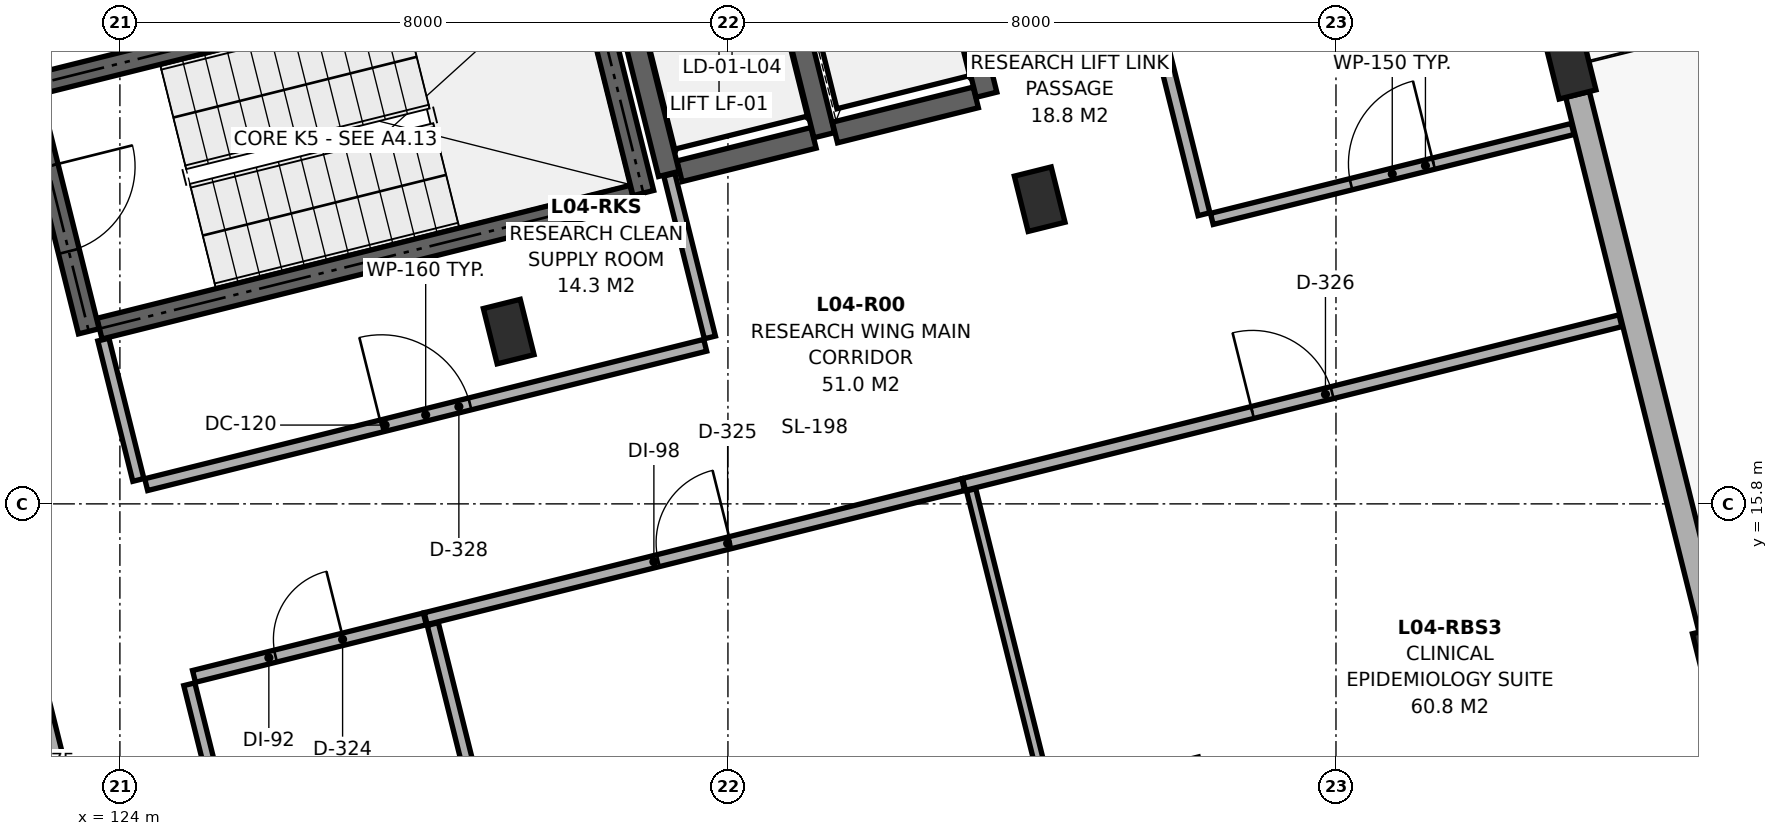
"""IFC4 building model, lengths in metres.
Left out: names, types, materials, properties, quantities, classifications, styles, units other than length and angle.
Written with IfcOpenShell. Run it as: python <this file> out.ifc"""

import sys

from ifc_helpers import new_model, si_unit, direction, frame, frame_2d, origin, origin_2d, place, context, subcontext, project, spatial, rectangle, extrude, element, fill, save


model = new_model("IFC4")
c1 = context("Model", 3, precision=1e-05, world=origin(), true_north=direction((0.0, 1.0)))
c2 = subcontext(c1, "Body", "Model", "MODEL_VIEW")
j1 = project(units=[si_unit("LENGTHUNIT", "METRE"), si_unit("PLANEANGLEUNIT", "RADIAN")], contexts=[c1])
p1 = place(None, origin())
s1 = spatial("IfcSite", under=j1, at=p1, CompositionType="ELEMENT")
p2 = place(p1, origin())
s2 = spatial("IfcBuilding", under=s1, at=p2, CompositionType="ELEMENT")
p3 = place(p2, frame((0.0, 0.0, 17.5)))
s3 = spatial("IfcBuildingStorey", under=s2, at=p3, CompositionType="ELEMENT", Elevation=17.5)
for number, where, z_axis, x_axis in (
    (1, (129.115, 18.067, 0.0), (0.0, 0.0, 1.0), (0.97, 0.242, 0.0)),
    (2, (138.037, 12.046, 0.0), (0.0, 0.0, 1.0), (0.97, 0.242, 0.0)),
    (3, (136.102, 19.808, 0.0), (0.0, 0.0, 1.0), (0.97, 0.242, 0.0)),
    (4, (145.023, 13.788, 0.0), (0.0, 0.0, 1.0), (0.97, 0.242, 0.0)),
    (5, (143.088, 21.55, 0.0), (0.0, 0.0, 1.0), (0.97, 0.242, 0.0)),
):
    element("IfcColumn", number, at=place(p3, frame(where, z_axis=z_axis, x_axis=x_axis)), inside=s3, PredefinedType="COLUMN", context=c2, shape_type="SweptSolid", body=[
        extrude(rectangle(XDim=0.5, YDim=0.75, at=origin_2d()), origin(), (0.0, 0.0, 1.0), 3.72),
    ])
p4 = place(p3, frame((143.178, 21.186, 0.0), z_axis=(0.0, 0.0, 1.0), x_axis=(0.241925454579, -0.970294838916, 0.0)))
e6 = element("IfcWall", 6, at=p4, inside=s3, PredefinedType="SOLIDWALL", context=c2, shape_type="SweptSolid", body=[
    extrude(rectangle(XDim=7.25, YDim=0.32, at=frame_2d((3.625, 0.0))), origin(), (0.0, 0.0, 1.0), 3.005),
])
p5 = place(p3, frame((123.974, 8.926, 0.0), z_axis=(0.0, 0.0, 1.0), x_axis=(-0.241917549853, 0.970296809782, 0.0)))
e7 = element("IfcWall", 7, at=p5, inside=s3, PredefinedType="SOLIDWALL", context=c2, shape_type="SweptSolid", body=[
    extrude(rectangle(XDim=7.25, YDim=0.32, at=frame_2d((3.625, 0.0))), origin(), (0.0, 0.0, 1.0), 3.005),
])
p6 = place(p3, frame((123.731, 18.105, 0.0), z_axis=(0.0, 0.0, 1.0), x_axis=(0.970297238923, 0.241915828623, 0.0)))
e8 = element("IfcWall", 8, at=p6, inside=s3, PredefinedType="SHEAR", context=c2, shape_type="SweptSolid", body=[
    extrude(rectangle(XDim=7.23, YDim=0.28, at=frame_2d((3.615, 0.0))), origin(), (0.0, 0.0, 1.0), 3.72),
])
p7 = place(p3, frame((130.887, 19.889, 0.0), z_axis=(0.0, 0.0, 1.0), x_axis=(-0.241947258837, 0.970289402158, 0.0)))
e9 = element("IfcWall", 9, at=p7, inside=s3, PredefinedType="SHEAR", context=c2, shape_type="SweptSolid", body=[
    extrude(rectangle(XDim=3.32, YDim=0.28, at=frame_2d((1.66, 0.0))), origin(), (0.0, 0.0, 1.0), 3.72),
])
p8 = place(p3, frame((129.943, 23.076, 0.0), z_axis=(0.0, 0.0, 1.0), x_axis=(-0.970289312034, -0.241947620266, 0.0)))
e10 = element("IfcWall", 10, at=p8, inside=s3, PredefinedType="SHEAR", context=c2, shape_type="SweptSolid", body=[
    extrude(rectangle(XDim=7.23, YDim=0.28, at=frame_2d((3.615, 0.0))), origin(), (0.0, 0.0, 1.0), 3.72),
])
p9 = place(p3, frame((122.787, 21.292, 0.0), z_axis=(0.0, 0.0, 1.0), x_axis=(0.241860763027, -0.970310966293, 0.0)))
e11 = element("IfcWall", 11, at=p9, inside=s3, PredefinedType="SHEAR", context=c2, shape_type="SweptSolid", body=[
    extrude(rectangle(XDim=3.32, YDim=0.28, at=frame_2d((1.66, 0.0))), origin(), (0.0, 0.0, 1.0), 3.72),
])
p10 = place(p9, frame((1.085, 0.0, 0.0)))
e12 = element("IfcOpeningElement", 12, at=p10, cuts=e11, PredefinedType="OPENING", context=c2, shape_type="SweptSolid", body=[
    extrude(rectangle(XDim=1.15, YDim=2.15, at=frame_2d((0.575, 1.075))), frame((0.0, 0.152, 0.0), z_axis=(0.0, -1.0, 0.0), x_axis=(1.0, 0.0, 0.0)), (0.0, 0.0, 1.0), 0.304),
])
p11 = place(p3, frame((131.363, 20.176, 0.0), z_axis=(0.0, 0.0, 1.0), x_axis=(0.970284587517, 0.241966566341, 0.0)))
e13 = element("IfcWall", 13, at=p11, inside=s3, PredefinedType="SHEAR", context=c2, shape_type="SweptSolid", body=[
    extrude(rectangle(XDim=1.817, YDim=0.28, at=frame_2d((0.909, 0.0))), origin(), (0.0, 0.0, 1.0), 3.72),
])
for number, where, z_axis, x_axis in (
    (14, (133.267, 20.651, 0.0), (0.0, 0.0, 1.0), (-0.242, 0.97, 0.0)),
    (15, (130.498, 23.046, 0.0), (0.0, 0.0, 1.0), (0.242, -0.97, 0.0)),
):
    element("IfcWall", number, at=place(p3, frame(where, z_axis=z_axis, x_axis=x_axis)), inside=s3, PredefinedType="SHEAR", context=c2, shape_type="SweptSolid", body=[
        extrude(rectangle(XDim=2.994, YDim=0.28, at=frame_2d((1.497, 0.0))), origin(), (0.0, 0.0, 1.0), 3.72),
    ])
p12 = place(p3, frame((133.408, 20.686, 0.0), z_axis=(0.0, 0.0, 1.0), x_axis=(0.970285190026, 0.241964150272, 0.0)))
e16 = element("IfcWall", 16, at=p12, inside=s3, PredefinedType="SHEAR", context=c2, shape_type="SweptSolid", body=[
    extrude(rectangle(XDim=1.91, YDim=0.28, at=frame_2d((0.955, 0.0))), origin(), (0.0, 0.0, 1.0), 3.72),
])
p13 = place(p3, frame((135.402, 21.183, 0.0), z_axis=(0.0, 0.0, 1.0), x_axis=(-0.241921647353, 0.970295788171, 0.0)))
e17 = element("IfcWall", 17, at=p13, inside=s3, PredefinedType="SHEAR", context=c2, shape_type="SweptSolid", body=[
    extrude(rectangle(XDim=2.994, YDim=0.28, at=frame_2d((1.497, 0.0))), origin(), (0.0, 0.0, 1.0), 3.72),
])
p14 = place(p3, frame((124.346, 16.053, 0.0), z_axis=(0.0, 0.0, 1.0), x_axis=(0.970295772287, 0.241921711059, 0.0)))
e18 = element("IfcWall", 18, at=p14, inside=s3, PredefinedType="PARTITIONING", context=c2, shape_type="SweptSolid", body=[
    extrude(rectangle(XDim=7.58, YDim=0.16, at=frame_2d((3.79, 0.0))), origin(), (0.0, 0.0, 1.0), 2.905),
])
p15 = place(p14, frame((3.19, 0.0, 0.0)))
e19 = element("IfcOpeningElement", 19, at=p15, cuts=e18, PredefinedType="OPENING", context=c2, shape_type="SweptSolid", body=[
    extrude(rectangle(XDim=1.2, YDim=2.15, at=frame_2d((0.6, 1.075))), frame((0.0, 0.092, 0.0), z_axis=(0.0, -1.0, 0.0), x_axis=(1.0, 0.0, 0.0)), (0.0, 0.0, 1.0), 0.184),
])
p16 = place(p3, frame((124.975, 13.53, 0.0), z_axis=(0.0, 0.0, 1.0), x_axis=(0.970289141252, 0.241948305158, 0.0)))
e20 = element("IfcWall", 20, at=p16, inside=s3, PredefinedType="PARTITIONING", context=c2, shape_type="SweptSolid", body=[
    extrude(rectangle(XDim=3.13, YDim=0.16, at=frame_2d((1.565, 0.0))), origin(), (0.0, 0.0, 1.0), 3.7),
])
p17 = place(p16, frame((1.105, 0.0, 0.0)))
e21 = element("IfcOpeningElement", 21, at=p17, cuts=e20, PredefinedType="OPENING", context=c2, shape_type="SweptSolid", body=[
    extrude(rectangle(XDim=0.92, YDim=2.1, at=frame_2d((0.46, 1.05))), frame((0.0, 0.092, 0.0), z_axis=(0.0, -1.0, 0.0), x_axis=(1.0, 0.0, 0.0)), (0.0, 0.0, 1.0), 0.184),
])
p18 = place(p3, frame((128.023, 14.29, 0.0), z_axis=(0.0, 0.0, 1.0), x_axis=(0.970294040363, 0.241928657328, 0.0)))
e22 = element("IfcWall", 22, at=p18, inside=s3, PredefinedType="PARTITIONING", context=c2, shape_type="SweptSolid", body=[
    extrude(rectangle(XDim=7.288, YDim=0.16, at=frame_2d((3.644, 0.0))), origin(), (0.0, 0.0, 1.0), 2.905),
])
p19 = place(p18, frame((3.154, 0.0, 0.0)))
e23 = element("IfcOpeningElement", 23, at=p19, cuts=e22, PredefinedType="OPENING", context=c2, shape_type="SweptSolid", body=[
    extrude(rectangle(XDim=0.98, YDim=2.12, at=frame_2d((0.49, 1.06))), frame((0.0, 0.092, 0.0), z_axis=(0.0, -1.0, 0.0), x_axis=(1.0, 0.0, 0.0)), (0.0, 0.0, 1.0), 0.184),
])
p20 = place(p3, frame((135.107, 16.056, 0.0), z_axis=(0.0, 0.0, 1.0), x_axis=(0.970295585276, 0.24192246112, 0.0)))
e24 = element("IfcWall", 24, at=p20, inside=s3, PredefinedType="PARTITIONING", context=c2, shape_type="SweptSolid", body=[
    extrude(rectangle(XDim=8.901, YDim=0.16, at=frame_2d((4.45, 0.0))), origin(), (0.0, 0.0, 1.0), 2.905),
])
p21 = place(p20, frame((3.91, 0.0, 0.0)))
e25 = element("IfcOpeningElement", 25, at=p21, cuts=e24, PredefinedType="OPENING", context=c2, shape_type="SweptSolid", body=[
    extrude(rectangle(XDim=1.08, YDim=2.18, at=frame_2d((0.54, 1.09))), frame((0.0, 0.092, 0.0), z_axis=(0.0, -1.0, 0.0), x_axis=(1.0, 0.0, 0.0)), (0.0, 0.0, 1.0), 0.184),
])
p22 = place(p3, frame((138.367, 19.549, 0.0), z_axis=(0.0, 0.0, 1.0), x_axis=(0.970289077222, 0.241948561938, 0.0)))
e26 = element("IfcWall", 26, at=p22, inside=s3, PredefinedType="PARTITIONING", context=c2, shape_type="SweptSolid", body=[
    extrude(rectangle(XDim=4.893, YDim=0.15, at=frame_2d((2.446, 0.0))), origin(), (0.0, 0.0, 1.0), 3.005),
])
p23 = place(p22, frame((1.886, 0.0, 0.0)))
e27 = element("IfcOpeningElement", 27, at=p23, cuts=e26, PredefinedType="OPENING", context=c2, shape_type="SweptSolid", body=[
    extrude(rectangle(XDim=1.12, YDim=2.2, at=frame_2d((0.56, 1.1))), frame((0.0, 0.087, 0.0), z_axis=(0.0, -1.0, 0.0), x_axis=(1.0, 0.0, 0.0)), (0.0, 0.0, 1.0), 0.174),
])
p24 = place(p3, frame((124.243, 16.115, 0.0), z_axis=(0.0, 0.0, 1.0), x_axis=(-0.241962034071, 0.970285717749, 0.0)))
e28 = element("IfcWall", 28, at=p24, inside=s3, PredefinedType="PARTITIONING", context=c2, shape_type="SweptSolid", body=[
    extrude(rectangle(XDim=1.903, YDim=0.15, at=frame_2d((0.952, 0.0))), origin(), (0.0, 0.0, 1.0), 3.005),
])
p25 = place(p3, frame((131.763, 17.99, 0.0), z_axis=(0.0, 0.0, 1.0), x_axis=(-0.241962612769, 0.970285573438, 0.0)))
e29 = element("IfcWall", 29, at=p25, inside=s3, PredefinedType="PARTITIONING", context=c2, shape_type="SweptSolid", body=[
    extrude(rectangle(XDim=2.206, YDim=0.15, at=frame_2d((1.103, 0.0))), origin(), (0.0, 0.0, 1.0), 3.005),
])
p26 = place(p3, frame((126.607, 6.632, 0.0), z_axis=(0.0, 0.0, 1.0), x_axis=(-0.241944970231, 0.970289972833, 0.0)))
e30 = element("IfcWall", 30, at=p26, inside=s3, PredefinedType="PARTITIONING", context=c2, shape_type="SweptSolid", body=[
    extrude(rectangle(XDim=7.003, YDim=0.15, at=frame_2d((3.501, 0.0))), origin(), (0.0, 0.0, 1.0), 3.005),
])
p27 = place(p3, frame((129.809, 7.43, 0.0), z_axis=(0.0, 0.0, 1.0), x_axis=(-0.241903328994, 0.970300355262, 0.0)))
e31 = element("IfcWall", 31, at=p27, inside=s3, PredefinedType="PARTITIONING", context=c2, shape_type="SweptSolid", body=[
    extrude(rectangle(XDim=6.996, YDim=0.15, at=frame_2d((3.498, 0.0))), origin(), (0.0, 0.0, 1.0), 3.005),
])
p28 = place(p3, frame((136.898, 9.172, 0.0), z_axis=(0.0, 0.0, 1.0), x_axis=(-0.241913757308, 0.970297755344, 0.0)))
e32 = element("IfcWall", 32, at=p28, inside=s3, PredefinedType="PARTITIONING", context=c2, shape_type="SweptSolid", body=[
    extrude(rectangle(XDim=7.021, YDim=0.125, at=frame_2d((3.51, 0.0))), origin(), (0.0, 0.0, 1.0), 3.005),
])
p29 = place(p3, frame((138.264, 19.611, 0.0), z_axis=(0.0, 0.0, 1.0), x_axis=(-0.241937132378, 0.970291927193, 0.0)))
e33 = element("IfcWall", 33, at=p29, inside=s3, PredefinedType="PARTITIONING", context=c2, shape_type="SweptSolid", body=[
    extrude(rectangle(XDim=8.543, YDim=0.16, at=frame_2d((4.271, 0.0))), origin(), (0.0, 0.0, 1.0), 3.055),
])
p30 = place(p10, origin())
e34 = element("IfcDoor", 34, at=p30, inside=s3, OperationType="SINGLE_SWING_LEFT", PredefinedType="DOOR", context=c2, shape_type="SweptSolid", body=[
    extrude(rectangle(XDim=1.15, YDim=2.15, at=frame_2d((0.575, 1.075))), frame((0.0, 0.025, 0.0), z_axis=(0.0, -1.0, 0.0), x_axis=(1.0, 0.0, 0.0)), (0.0, 0.0, 1.0), 0.05),
])
fill(e12, e34)
p31 = place(p15, origin())
e35 = element("IfcDoor", 35, at=p31, inside=s3, OperationType="SINGLE_SWING_LEFT", PredefinedType="DOOR", context=c2, shape_type="SweptSolid", body=[
    extrude(rectangle(XDim=1.2, YDim=2.15, at=frame_2d((0.6, 1.075))), frame((0.0, 0.025, 0.0), z_axis=(0.0, -1.0, 0.0), x_axis=(1.0, 0.0, 0.0)), (0.0, 0.0, 1.0), 0.05),
])
fill(e19, e35)
p32 = place(p17, origin())
e36 = element("IfcDoor", 36, at=p32, inside=s3, OperationType="SINGLE_SWING_RIGHT", PredefinedType="DOOR", context=c2, shape_type="SweptSolid", body=[
    extrude(rectangle(XDim=0.92, YDim=2.1, at=frame_2d((0.46, 1.05))), frame((0.0, 0.025, 0.0), z_axis=(0.0, -1.0, 0.0), x_axis=(1.0, 0.0, 0.0)), (0.0, 0.0, 1.0), 0.05),
])
fill(e21, e36)
p33 = place(p19, origin())
e37 = element("IfcDoor", 37, at=p33, inside=s3, OperationType="SINGLE_SWING_RIGHT", PredefinedType="DOOR", context=c2, shape_type="SweptSolid", body=[
    extrude(rectangle(XDim=0.98, YDim=2.12, at=frame_2d((0.49, 1.06))), frame((0.0, 0.025, 0.0), z_axis=(0.0, -1.0, 0.0), x_axis=(1.0, 0.0, 0.0)), (0.0, 0.0, 1.0), 0.05),
])
fill(e23, e37)
p34 = place(p21, origin())
e38 = element("IfcDoor", 38, at=p34, inside=s3, OperationType="SINGLE_SWING_LEFT", PredefinedType="DOOR", context=c2, shape_type="SweptSolid", body=[
    extrude(rectangle(XDim=1.08, YDim=2.18, at=frame_2d((0.54, 1.09))), frame((0.0, 0.025, 0.0), z_axis=(0.0, -1.0, 0.0), x_axis=(1.0, 0.0, 0.0)), (0.0, 0.0, 1.0), 0.05),
])
fill(e25, e38)
p35 = place(p23, origin())
e39 = element("IfcDoor", 39, at=p35, inside=s3, OperationType="SINGLE_SWING_RIGHT", PredefinedType="DOOR", context=c2, shape_type="SweptSolid", body=[
    extrude(rectangle(XDim=1.12, YDim=2.2, at=frame_2d((0.56, 1.1))), frame((0.0, 0.025, 0.0), z_axis=(0.0, -1.0, 0.0), x_axis=(1.0, 0.0, 0.0)), (0.0, 0.0, 1.0), 0.05),
])
fill(e27, e39)
save(model, sys.argv[1])
